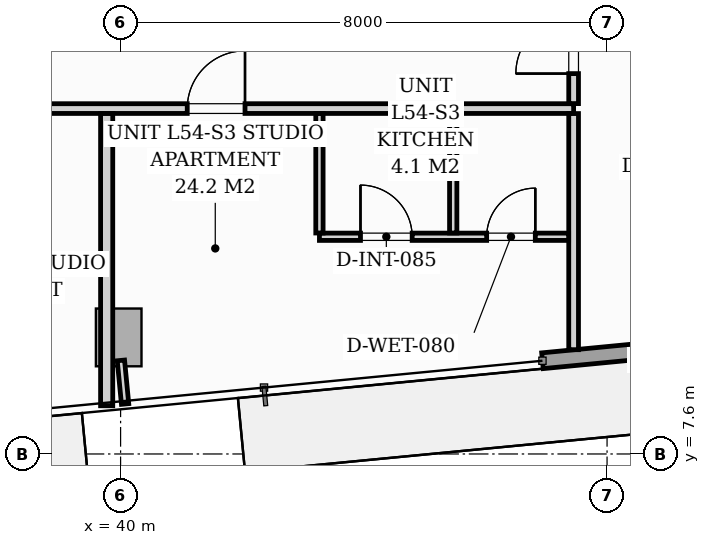
"""IFC4 building model, lengths in metres.
Left out: names, types, materials, properties, quantities, classifications, styles, units other than length and angle.
Written with IfcOpenShell. Run it as: python <this file> out.ifc"""

import sys

from ifc_helpers import new_model, si_unit, direction, frame, frame_2d, origin, origin_2d, place, context, subcontext, project, spatial, rectangle, extrude, source, transform, mapped, element, fill, save


model = new_model("IFC4")
c1 = context("Model", 3, precision=1e-05, world=origin(), true_north=direction((0.0, 1.0)))
c2 = subcontext(c1, "Body", "Model", "MODEL_VIEW")
j1 = project(units=[si_unit("LENGTHUNIT", "METRE"), si_unit("PLANEANGLEUNIT", "RADIAN")], contexts=[c1])
p1 = place(None, origin())
s1 = spatial("IfcSite", under=j1, at=p1, CompositionType="ELEMENT")
p2 = place(p1, origin())
s2 = spatial("IfcBuilding", under=s1, at=p2, CompositionType="ELEMENT")
p3 = place(p2, frame((0.0, 0.0, 189.0)))
s3 = spatial("IfcBuildingStorey", under=s2, at=p3, CompositionType="ELEMENT", Elevation=189.0)
m1 = source(origin(), c2, "Body", "SweptSolid", [
    extrude(rectangle(XDim=0.75, YDim=0.95, at=origin_2d()), origin(), (0.0, 0.0, 1.0), 3.196),
])
p4 = place(p3, frame((39.969, 9.517, 0.002), z_axis=(0.0, 0.0, 1.0), x_axis=(0.995396198367, 0.09584575252, 0.0)))
e1 = element("IfcColumn", 1, at=p4, inside=s3, PredefinedType="COLUMN", context=c2, shape_type="MappedRepresentation", body=[
    mapped(m1, transform((0.0, 0.0, 0.0), scale=1.0)),
])
p5 = place(p3, frame((62.963, 10.676, 0.0), z_axis=(0.0, 0.0, 1.0), x_axis=(-0.995395627913, -0.095851676732, 0.0)))
e2 = element("IfcWall", 2, at=p5, inside=s3, PredefinedType="STANDARD", context=c2, shape_type="SweptSolid", body=[
    extrude(rectangle(XDim=16.1, YDim=0.26, at=frame_2d((8.05, 0.0))), origin(), (0.0, 0.0, 1.0), 2.94),
])
p6 = place(p5, frame((8.247, 0.0, 0.0)))
e3 = element("IfcOpeningElement", 3, at=p6, cuts=e2, PredefinedType="OPENING", context=c2, shape_type="SweptSolid", body=[
    extrude(rectangle(XDim=1.8, YDim=2.06, at=frame_2d((0.9, 1.03))), frame((0.0, 0.14, 0.0), z_axis=(0.0, -1.0, 0.0), x_axis=(1.0, 0.0, 0.0)), (0.0, 0.0, 1.0), 0.28),
])
p7 = place(p5, frame((2.05, 0.0, 0.65)))
e4 = element("IfcOpeningElement", 4, at=p7, cuts=e2, PredefinedType="OPENING", context=c2, shape_type="SweptSolid", body=[
    extrude(rectangle(XDim=1.6, YDim=1.5, at=frame_2d((0.8, 0.75))), frame((0.0, 0.14, 0.0), z_axis=(0.0, -1.0, 0.0), x_axis=(1.0, 0.0, 0.0)), (0.0, 0.0, 1.0), 0.28),
])
p8 = place(p3, frame((26.12, 13.28, 0.0), z_axis=(0.0, 0.0, 1.0), x_axis=(1.0, 0.0, 0.0)))
e5 = element("IfcWall", 5, at=p8, inside=s3, PredefinedType="PARTITIONING", context=c2, shape_type="SweptSolid", body=[
    extrude(rectangle(XDim=21.33, YDim=0.16, at=frame_2d((10.665, 0.0))), origin(), (0.0, 0.0, 1.0), 2.94),
])
p9 = place(p8, frame((4.704, 0.0, 0.0)))
e6 = element("IfcOpeningElement", 6, at=p9, cuts=e5, PredefinedType="OPENING", context=c2, shape_type="SweptSolid", body=[
    extrude(rectangle(XDim=0.95, YDim=2.06, at=frame_2d((0.475, 1.03))), frame((0.0, 0.09, 0.0), z_axis=(0.0, -1.0, 0.0), x_axis=(1.0, 0.0, 0.0)), (0.0, 0.0, 1.0), 0.18),
])
p10 = place(p8, frame((11.6, 0.0, 0.0)))
e7 = element("IfcOpeningElement", 7, at=p10, cuts=e5, PredefinedType="OPENING", context=c2, shape_type="SweptSolid", body=[
    extrude(rectangle(XDim=0.95, YDim=2.06, at=frame_2d((0.475, 1.03))), frame((0.0, 0.09, 0.0), z_axis=(0.0, -1.0, 0.0), x_axis=(1.0, 0.0, 0.0)), (0.0, 0.0, 1.0), 0.18),
])
p11 = place(p8, frame((14.976, 0.0, 0.0)))
e8 = element("IfcOpeningElement", 8, at=p11, cuts=e5, PredefinedType="OPENING", context=c2, shape_type="SweptSolid", body=[
    extrude(rectangle(XDim=0.95, YDim=2.06, at=frame_2d((0.475, 1.03))), frame((0.0, 0.09, 0.0), z_axis=(0.0, -1.0, 0.0), x_axis=(1.0, 0.0, 0.0)), (0.0, 0.0, 1.0), 0.18),
])
p12 = place(p3, frame((47.45, 9.315, 0.0), z_axis=(0.0, 0.0, 1.0), x_axis=(0.0, 1.0, 0.0)))
e9 = element("IfcWall", 9, at=p12, inside=s3, PredefinedType="PARTITIONING", context=c2, shape_type="SweptSolid", body=[
    extrude(rectangle(XDim=3.883, YDim=0.16, at=frame_2d((1.941, 0.0))), origin(), (0.0, 0.0, 1.0), 2.94),
])
p13 = place(p3, frame((47.45, 13.362, 0.0), z_axis=(0.0, 0.0, 1.0), x_axis=(0.0, 1.0, 0.0)))
e10 = element("IfcWall", 10, at=p13, inside=s3, PredefinedType="PARTITIONING", context=c2, shape_type="SweptSolid", body=[
    extrude(rectangle(XDim=7.288, YDim=0.16, at=frame_2d((3.644, 0.0))), origin(), (0.0, 0.0, 1.0), 2.94),
])
p14 = place(p13, frame((0.493, 0.0, 0.0)))
e11 = element("IfcOpeningElement", 11, at=p14, cuts=e10, PredefinedType="OPENING", context=c2, shape_type="SweptSolid", body=[
    extrude(rectangle(XDim=0.95, YDim=2.06, at=frame_2d((0.475, 1.03))), frame((0.0, 0.09, 0.0), z_axis=(0.0, -1.0, 0.0), x_axis=(1.0, 0.0, 0.0)), (0.0, 0.0, 1.0), 0.18),
])
p15 = place(p13, frame((4.783, 0.0, 0.0)))
e12 = element("IfcOpeningElement", 12, at=p15, cuts=e10, PredefinedType="OPENING", context=c2, shape_type="SweptSolid", body=[
    extrude(rectangle(XDim=0.95, YDim=2.06, at=frame_2d((0.475, 1.03))), frame((0.0, 0.09, 0.0), z_axis=(0.0, -1.0, 0.0), x_axis=(1.0, 0.0, 0.0)), (0.0, 0.0, 1.0), 0.18),
])
p16 = place(p3, frame((39.771, 8.393, 0.0), z_axis=(0.0, 0.0, 1.0), x_axis=(0.0, 1.0, 0.0)))
e13 = element("IfcWall", 13, at=p16, inside=s3, PredefinedType="PARTITIONING", context=c2, shape_type="SweptSolid", body=[
    extrude(rectangle(XDim=4.805, YDim=0.2, at=frame_2d((2.403, 0.0))), origin(), (0.0, 0.0, 1.0), 2.94),
])
p17 = place(p3, frame((43.27, 11.172, 0.0), z_axis=(0.0, 0.0, 1.0), x_axis=(1.0, 0.0, 0.0)))
e14 = element("IfcWall", 14, at=p17, inside=s3, PredefinedType="PARTITIONING", context=c2, shape_type="SweptSolid", body=[
    extrude(rectangle(XDim=4.098, YDim=0.12, at=frame_2d((2.049, 0.0))), origin(), (0.0, 0.0, 1.0), 2.94),
])
p18 = place(p17, frame((0.675, 0.0, 0.0)))
e15 = element("IfcOpeningElement", 15, at=p18, cuts=e14, PredefinedType="OPENING", context=c2, shape_type="SweptSolid", body=[
    extrude(rectangle(XDim=0.85, YDim=2.05, at=frame_2d((0.425, 1.025))), frame((0.0, 0.07, 0.0), z_axis=(0.0, -1.0, 0.0), x_axis=(1.0, 0.0, 0.0)), (0.0, 0.0, 1.0), 0.14),
])
p19 = place(p17, frame((2.75, 0.0, 0.0)))
e16 = element("IfcOpeningElement", 16, at=p19, cuts=e14, PredefinedType="OPENING", context=c2, shape_type="SweptSolid", body=[
    extrude(rectangle(XDim=0.8, YDim=2.02, at=frame_2d((0.4, 1.01))), frame((0.0, 0.07, 0.0), z_axis=(0.0, -1.0, 0.0), x_axis=(1.0, 0.0, 0.0)), (0.0, 0.0, 1.0), 0.14),
])
for number, where, z_axis, x_axis in (
    (17, (43.27, 11.234, 0.0), (0.0, 0.0, 1.0), (0.0, 1.0, 0.0)),
    (18, (45.47, 11.234, 0.0), (0.0, 0.0, 1.0), (0.0, 1.0, 0.0)),
):
    element("IfcWall", number, at=place(p3, frame(where, z_axis=z_axis, x_axis=x_axis)), inside=s3, PredefinedType="PARTITIONING", context=c2, shape_type="SweptSolid", body=[
        extrude(rectangle(XDim=1.964, YDim=0.12, at=frame_2d((0.982, 0.0))), origin(), (0.0, 0.0, 1.0), 2.94),
    ])
p20 = place(p3, frame((40.005, 9.139, 0.0), z_axis=(0.0, 0.0, 1.0), x_axis=(0.095977354523, -0.995383517755, 0.0)))
e19 = element("IfcWall", 19, at=p20, inside=s3, PredefinedType="PARTITIONING", context=c2, shape_type="SweptSolid", body=[
    extrude(rectangle(XDim=0.72, YDim=0.12, at=frame_2d((0.36, 0.0))), origin(), (0.0, 0.0, 1.0), 2.94),
])
m2 = source(origin(), c2, "Body", "SweptSolid", [
    extrude(rectangle(XDim=0.95, YDim=2.06, at=frame_2d((0.475, 1.03))), frame((0.0, 0.025, 0.0), z_axis=(0.0, -1.0, 0.0), x_axis=(1.0, 0.0, 0.0)), (0.0, 0.0, 1.0), 0.05),
])
p21 = place(p11, origin())
e20 = element("IfcDoor", 20, at=p21, inside=s3, OperationType="SINGLE_SWING_RIGHT", PredefinedType="DOOR", context=c2, shape_type="MappedRepresentation", body=[
    mapped(m2, transform((0.0, 0.0, 0.0), scale=1.0)),
])
fill(e8, e20)
m3 = source(origin(), c2, "Body", "SweptSolid", [
    extrude(rectangle(XDim=0.85, YDim=2.05, at=frame_2d((0.425, 1.025))), frame((0.0, 0.025, 0.0), z_axis=(0.0, -1.0, 0.0), x_axis=(1.0, 0.0, 0.0)), (0.0, 0.0, 1.0), 0.05),
])
p22 = place(p18, origin())
e21 = element("IfcDoor", 21, at=p22, inside=s3, OperationType="SINGLE_SWING_LEFT", PredefinedType="DOOR", context=c2, shape_type="MappedRepresentation", body=[
    mapped(m3, transform((0.0, 0.0, 0.0), scale=1.0)),
])
fill(e15, e21)
m4 = source(origin(), c2, "Body", "SweptSolid", [
    extrude(rectangle(XDim=0.8, YDim=2.02, at=frame_2d((0.4, 1.01))), frame((0.0, 0.025, 0.0), z_axis=(0.0, -1.0, 0.0), x_axis=(1.0, 0.0, 0.0)), (0.0, 0.0, 1.0), 0.05),
])
p23 = place(p19, origin())
e22 = element("IfcDoor", 22, at=p23, inside=s3, OperationType="SINGLE_SWING_RIGHT", PredefinedType="DOOR", context=c2, shape_type="MappedRepresentation", body=[
    mapped(m4, transform((0.0, 0.0, 0.0), scale=1.0)),
])
fill(e16, e22)
p24 = place(p14, origin())
e23 = element("IfcDoor", 23, at=p24, inside=s3, OperationType="SINGLE_SWING_LEFT", PredefinedType="DOOR", context=c2, shape_type="MappedRepresentation", body=[
    mapped(m2, transform((0.0, 0.0, 0.0), scale=1.0)),
])
fill(e11, e23)
save(model, sys.argv[1])
